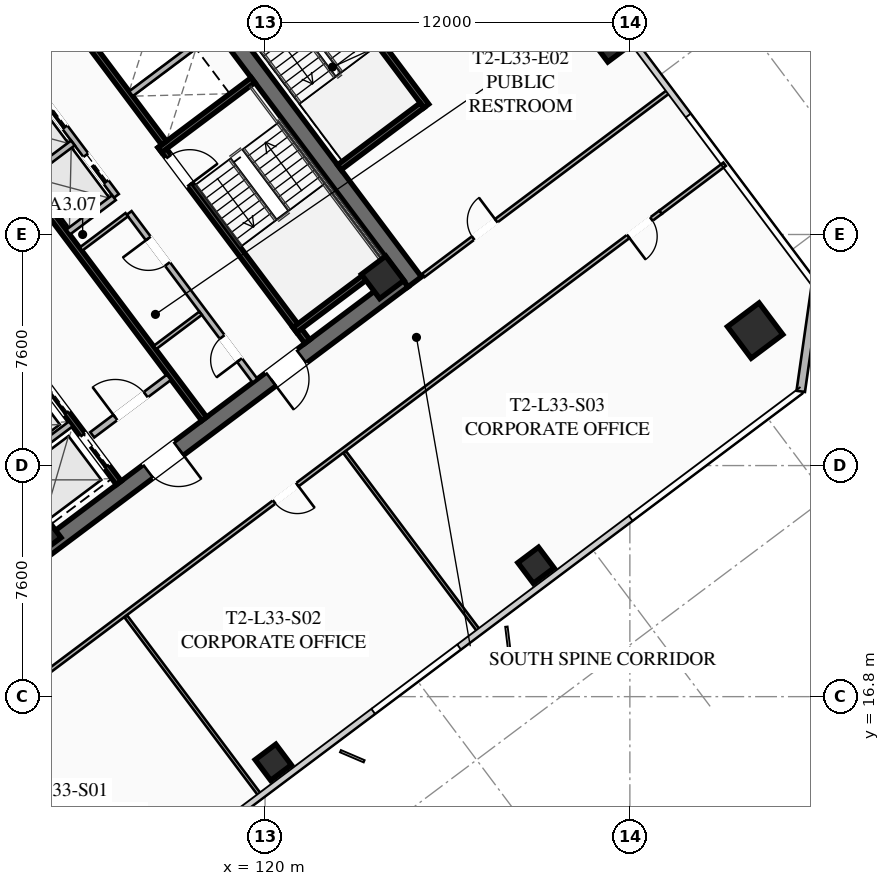
"""IFC4 building model, lengths in metres.
Left out: names, types, materials, properties, quantities, classifications, styles, units other than length and angle.
Written with IfcOpenShell. Run it as: python <this file> out.ifc"""

import sys

from ifc_helpers import new_model, si_unit, direction, frame, frame_2d, origin, origin_2d, place, context, subcontext, project, spatial, rectangle, hollow_rectangle, extrude, element, fill, save


model = new_model("IFC4")
c1 = context("Model", 3, precision=1e-05, world=origin(), true_north=direction((0.0, 1.0)))
c2 = subcontext(c1, "Body", "Model", "MODEL_VIEW")
j1 = project(units=[si_unit("LENGTHUNIT", "METRE"), si_unit("PLANEANGLEUNIT", "RADIAN")], contexts=[c1])
p1 = place(None, origin())
s1 = spatial("IfcSite", under=j1, at=p1, CompositionType="ELEMENT")
p2 = place(p1, origin())
s2 = spatial("IfcBuilding", under=s1, at=p2, CompositionType="ELEMENT")
p3 = place(p2, frame((0.0, 0.0, 125.05)))
s3 = spatial("IfcBuildingStorey", under=s2, at=p3, CompositionType="ELEMENT", Elevation=125.05)
p4 = place(p3, frame((115.564, 42.923, 0.0), z_axis=(0.0, 0.0, 1.0), x_axis=(0.600005007985, -0.799996243986, 0.0)))
e1 = element("IfcWall", 1, at=p4, inside=s3, PredefinedType="SHEAR", context=c2, shape_type="SweptSolid", body=[
    extrude(rectangle(XDim=15.6, YDim=0.55, at=frame_2d((7.8, 0.0))), origin(), (0.0, 0.0, 1.0), 3.55),
])
p5 = place(p3, frame((124.539, 30.498, 0.0), z_axis=(0.0, 0.0, 1.0), x_axis=(-0.799998054672, -0.600002593761, 0.0)))
e2 = element("IfcWall", 2, at=p5, inside=s3, PredefinedType="SHEAR", context=c2, shape_type="SweptSolid", body=[
    extrude(rectangle(XDim=15.06, YDim=0.55, at=frame_2d((7.53, 0.0))), origin(), (0.0, 0.0, 1.0), 3.55),
])
p6 = place(p5, frame((9.23, 0.0, 0.0)))
e3 = element("IfcOpeningElement", 3, at=p6, cuts=e2, PredefinedType="OPENING", context=c2, shape_type="SweptSolid", body=[
    extrude(rectangle(XDim=1.25, YDim=2.25, at=frame_2d((0.625, 1.125))), frame((0.0, 0.285, 0.0), z_axis=(0.0, -1.0, 0.0), x_axis=(1.0, 0.0, 0.0)), (0.0, 0.0, 1.0), 0.57),
])
p7 = place(p5, frame((4.18, 0.0, 0.0)))
e4 = element("IfcOpeningElement", 4, at=p7, cuts=e2, PredefinedType="OPENING", context=c2, shape_type="SweptSolid", body=[
    extrude(rectangle(XDim=1.25, YDim=2.25, at=frame_2d((0.625, 1.125))), frame((0.0, 0.285, 0.0), z_axis=(0.0, -1.0, 0.0), x_axis=(1.0, 0.0, 0.0)), (0.0, 0.0, 1.0), 0.57),
])
p8 = place(p3, frame((103.461, 33.502, 0.0), z_axis=(0.0, 0.0, 1.0), x_axis=(0.799998054672, 0.600002593761, 0.0)))
e5 = element("IfcWall", 5, at=p8, inside=s3, PredefinedType="SHEAR", context=c2, shape_type="SweptSolid", body=[
    extrude(rectangle(XDim=15.06, YDim=0.55, at=frame_2d((7.53, 0.0))), origin(), (0.0, 0.0, 1.0), 3.55),
])
p9 = place(p8, frame((4.58, 0.0, 0.0)))
e6 = element("IfcOpeningElement", 6, at=p9, cuts=e5, PredefinedType="OPENING", context=c2, shape_type="SweptSolid", body=[
    extrude(rectangle(XDim=1.25, YDim=2.25, at=frame_2d((0.625, 1.125))), frame((0.0, 0.285, 0.0), z_axis=(0.0, -1.0, 0.0), x_axis=(1.0, 0.0, 0.0)), (0.0, 0.0, 1.0), 0.57),
])
p10 = place(p8, frame((9.63, 0.0, 0.0)))
e7 = element("IfcOpeningElement", 7, at=p10, cuts=e5, PredefinedType="OPENING", context=c2, shape_type="SweptSolid", body=[
    extrude(rectangle(XDim=1.25, YDim=2.25, at=frame_2d((0.625, 1.125))), frame((0.0, 0.285, 0.0), z_axis=(0.0, -1.0, 0.0), x_axis=(1.0, 0.0, 0.0)), (0.0, 0.0, 1.0), 0.57),
])
for number, where, z_axis, x_axis in (
    (8, (112.59, 22.13, 0.0), (0.0, 0.0, 1.0), (0.8, 0.6, 0.0)),
    (9, (123.87, 30.59, 0.0), (0.0, 0.0, 1.0), (0.8, 0.6, 0.0)),
):
    element("IfcColumn", number, at=place(p3, frame(where, z_axis=z_axis, x_axis=x_axis)), inside=s3, PredefinedType="COLUMN", context=c2, shape_type="SweptSolid", body=[
        extrude(hollow_rectangle(XDim=1.0, YDim=1.0, WallThickness=0.04, at=origin_2d()), origin(), (0.0, 0.0, 1.0), 3.37),
    ])
p11 = place(p3, frame((136.12, 28.84, 0.0), z_axis=(0.0, 0.0, 1.0), x_axis=(0.799999996291, 0.600000004945, 0.0)))
e10 = element("IfcColumn", 10, at=p11, inside=s3, PredefinedType="COLUMN", context=c2, shape_type="SweptSolid", body=[
    extrude(hollow_rectangle(XDim=1.3, YDim=1.3, WallThickness=0.05, at=origin_2d()), origin(), (0.0, 0.0, 1.0), 3.37),
])
for number, where, z_axis, x_axis in (
    (11, (120.27, 14.64, 0.0), (0.0, 0.0, 1.0), (0.8, 0.6, 0.0)),
    (12, (128.91, 21.12, 0.0), (0.0, 0.0, 1.0), (0.8, 0.6, 0.0)),
    (13, (131.36, 38.27, 0.0), (0.0, 0.0, 1.0), (0.8, 0.6, 0.0)),
):
    element("IfcColumn", number, at=place(p3, frame(where, z_axis=z_axis, x_axis=x_axis)), inside=s3, PredefinedType="COLUMN", context=c2, shape_type="SweptSolid", body=[
        extrude(hollow_rectangle(XDim=0.85, YDim=0.85, WallThickness=0.035, at=origin_2d()), origin(), (0.0, 0.0, 1.0), 3.37),
    ])
p12 = place(p3, frame((138.12, 30.34, 0.0), z_axis=(0.0, 0.0, 1.0), x_axis=(-0.141421356237, -0.989949493661, 0.0)))
e14 = element("IfcWall", 14, at=p12, inside=s3, PredefinedType="SOLIDWALL", context=c2, shape_type="SweptSolid", body=[
    extrude(rectangle(XDim=3.536, YDim=0.28, at=frame_2d((1.768, 0.0))), origin(), (0.0, 0.0, 1.0), 3.37),
])
p13 = place(p3, frame((116.56, 34.92, 0.0), z_axis=(0.0, 0.0, 1.0), x_axis=(0.59999029481, -0.8000072788, 0.0)))
e15 = element("IfcWall", 15, at=p13, inside=s3, PredefinedType="SHEAR", context=c2, shape_type="SweptSolid", body=[
    extrude(rectangle(XDim=8.05, YDim=0.2, at=frame_2d((4.025, 0.0))), origin(), (0.0, 0.0, 1.0), 3.37),
])
p14 = place(p13, frame((0.45, 0.0, 0.0)))
e16 = element("IfcOpeningElement", 16, at=p14, cuts=e15, PredefinedType="OPENING", context=c2, shape_type="SweptSolid", body=[
    extrude(rectangle(XDim=1.15, YDim=2.2, at=frame_2d((0.575, 1.1))), frame((0.0, 0.11, 0.0), z_axis=(0.0, -1.0, 0.0), x_axis=(1.0, 0.0, 0.0)), (0.0, 0.0, 1.0), 0.22),
])
for number, where, z_axis, x_axis in (
    (17, (116.54, 34.78, 0.0), (0.0, 0.0, 1.0), (0.8, 0.6, 0.0)),
    (18, (120.98, 28.86, 0.0), (0.0, 0.0, 1.0), (0.8, 0.6, 0.0)),
):
    element("IfcWall", number, at=place(p3, frame(where, z_axis=z_axis, x_axis=x_axis)), inside=s3, PredefinedType="SHEAR", context=c2, shape_type="SweptSolid", body=[
        extrude(rectangle(XDim=3.83, YDim=0.2, at=frame_2d((1.915, 0.0))), origin(), (0.0, 0.0, 1.0), 3.37),
    ])
p15 = place(p3, frame((117.998, 25.936, 0.0), z_axis=(0.0, 0.0, 1.0), x_axis=(-0.600002693989, 0.799997979501, 0.0)))
e19 = element("IfcWall", 19, at=p15, inside=s3, PredefinedType="SHEAR", context=c2, shape_type="SweptSolid", body=[
    extrude(rectangle(XDim=14.5, YDim=0.2, at=frame_2d((7.25, 0.0))), origin(), (0.0, 0.0, 1.0), 3.37),
])
p16 = place(p3, frame((114.316, 25.412, 0.0), z_axis=(0.0, 0.0, 1.0), x_axis=(0.800018601094, 0.59997519774, 0.0)))
e20 = element("IfcWall", 20, at=p16, inside=s3, PredefinedType="SOLIDWALL", context=c2, shape_type="SweptSolid", body=[
    extrude(rectangle(XDim=3.15, YDim=0.22, at=frame_2d((1.575, 0.0))), origin(), (0.0, 0.0, 1.0), 2.723),
])
p17 = place(p16, frame((0.95, 0.0, 0.0)))
e21 = element("IfcOpeningElement", 21, at=p17, cuts=e20, PredefinedType="OPENING", context=c2, shape_type="SweptSolid", body=[
    extrude(rectangle(XDim=1.25, YDim=2.25, at=frame_2d((0.625, 1.125))), frame((0.0, 0.12, 0.0), z_axis=(0.0, -1.0, 0.0), x_axis=(1.0, 0.0, 0.0)), (0.0, 0.0, 1.0), 0.24),
])
p18 = place(p3, frame((115.19, 23.83, 0.0), z_axis=(0.0, 0.0, 1.0), x_axis=(-0.599993943644, 0.800004542231, 0.0)))
e22 = element("IfcWall", 22, at=p18, inside=s3, PredefinedType="SHEAR", context=c2, shape_type="SweptSolid", body=[
    extrude(rectangle(XDim=6.45, YDim=0.2, at=frame_2d((3.225, 0.0))), origin(), (0.0, 0.0, 1.0), 3.37),
])
p19 = place(p18, frame((4.875, 0.0, 0.0)))
e23 = element("IfcOpeningElement", 23, at=p19, cuts=e22, PredefinedType="OPENING", context=c2, shape_type="SweptSolid", body=[
    extrude(rectangle(XDim=1.3, YDim=2.25, at=frame_2d((0.65, 1.125))), frame((0.0, 0.11, 0.0), z_axis=(0.0, -1.0, 0.0), x_axis=(1.0, 0.0, 0.0)), (0.0, 0.0, 1.0), 0.22),
])
p20 = place(p18, frame((2.875, 0.0, 0.0)))
e24 = element("IfcOpeningElement", 24, at=p20, cuts=e22, PredefinedType="OPENING", context=c2, shape_type="SweptSolid", body=[
    extrude(rectangle(XDim=1.3, YDim=2.25, at=frame_2d((0.65, 1.125))), frame((0.0, 0.11, 0.0), z_axis=(0.0, -1.0, 0.0), x_axis=(1.0, 0.0, 0.0)), (0.0, 0.0, 1.0), 0.22),
])
p21 = place(p18, frame((0.675, 0.0, 0.0)))
e25 = element("IfcOpeningElement", 25, at=p21, cuts=e22, PredefinedType="OPENING", context=c2, shape_type="SweptSolid", body=[
    extrude(rectangle(XDim=1.3, YDim=2.25, at=frame_2d((0.65, 1.125))), frame((0.0, 0.11, 0.0), z_axis=(0.0, -1.0, 0.0), x_axis=(1.0, 0.0, 0.0)), (0.0, 0.0, 1.0), 0.22),
])
p22 = place(p3, frame((110.826, 23.682, 0.0), z_axis=(0.0, 0.0, 1.0), x_axis=(0.8, 0.6, 0.0)))
e26 = element("IfcWall", 26, at=p22, inside=s3, PredefinedType="SOLIDWALL", context=c2, shape_type="SweptSolid", body=[
    extrude(rectangle(XDim=3.48, YDim=0.2, at=frame_2d((1.74, 0.0))), origin(), (0.0, 0.0, 1.0), 3.37),
])
p23 = place(p3, frame((112.81, 40.17, 0.0), z_axis=(0.0, 0.0, 1.0), x_axis=(0.599993943644, -0.800004542231, 0.0)))
e27 = element("IfcWall", 27, at=p23, inside=s3, PredefinedType="SHEAR", context=c2, shape_type="SweptSolid", body=[
    extrude(rectangle(XDim=6.45, YDim=0.2, at=frame_2d((3.225, 0.0))), origin(), (0.0, 0.0, 1.0), 3.37),
])
p24 = place(p3, frame((115.59, 36.63, 0.0), z_axis=(0.0, 0.0, 1.0), x_axis=(0.799974743577, 0.600033673754, 0.0)))
e28 = element("IfcWall", 28, at=p24, inside=s3, PredefinedType="SOLIDWALL", context=c2, shape_type="SweptSolid", body=[
    extrude(rectangle(XDim=3.48, YDim=0.2, at=frame_2d((1.74, 0.0))), origin(), (0.0, 0.0, 1.0), 3.37),
])
p25 = place(p3, frame((119.67, 27.19, 0.0), z_axis=(0.0, 0.0, 1.0), x_axis=(-0.599988677396, 0.800008491828, 0.0)))
e29 = element("IfcWall", 29, at=p25, inside=s3, PredefinedType="SOLIDWALL", context=c2, shape_type="SweptSolid", body=[
    extrude(rectangle(XDim=6.9, YDim=0.2, at=frame_2d((3.45, 0.0))), origin(), (0.0, 0.0, 1.0), 2.723),
])
p26 = place(p25, frame((0.85, 0.0, 0.0)))
e30 = element("IfcOpeningElement", 30, at=p26, cuts=e29, PredefinedType="OPENING", context=c2, shape_type="SweptSolid", body=[
    extrude(rectangle(XDim=0.95, YDim=2.05, at=frame_2d((0.475, 1.025))), frame((0.0, 0.11, 0.0), z_axis=(0.0, -1.0, 0.0), x_axis=(1.0, 0.0, 0.0)), (0.0, 0.0, 1.0), 0.22),
])
p27 = place(p25, frame((4.8, 0.0, 0.0)))
e31 = element("IfcOpeningElement", 31, at=p27, cuts=e29, PredefinedType="OPENING", context=c2, shape_type="SweptSolid", body=[
    extrude(rectangle(XDim=1.05, YDim=2.2, at=frame_2d((0.525, 1.1))), frame((0.0, 0.11, 0.0), z_axis=(0.0, -1.0, 0.0), x_axis=(1.0, 0.0, 0.0)), (0.0, 0.0, 1.0), 0.22),
])
for number, where, z_axis, x_axis in (
    (32, (113.946, 31.522, 0.0), (0.0, 0.0, 1.0), (0.8, 0.6, 0.0)),
    (33, (116.376, 28.282, 0.0), (0.0, 0.0, 1.0), (0.8, 0.6, 0.0)),
):
    element("IfcWall", number, at=place(p3, frame(where, z_axis=z_axis, x_axis=x_axis)), inside=s3, PredefinedType="PARTITIONING", context=c2, shape_type="SweptSolid", body=[
        extrude(rectangle(XDim=1.88, YDim=0.135, at=frame_2d((0.94, 0.0))), origin(), (0.0, 0.0, 1.0), 2.723),
    ])
p28 = place(p3, frame((115.11, 33.27, 0.0), z_axis=(0.0, 0.0, 1.0), x_axis=(-0.600011322243, 0.799991508192, 0.0)))
e34 = element("IfcWall", 34, at=p28, inside=s3, PredefinedType="SOLIDWALL", context=c2, shape_type="SweptSolid", body=[
    extrude(rectangle(XDim=6.9, YDim=0.2, at=frame_2d((3.45, 0.0))), origin(), (0.0, 0.0, 1.0), 3.37),
])
p29 = place(p28, frame((0.575, 0.0, 0.0)))
e35 = element("IfcOpeningElement", 35, at=p29, cuts=e34, PredefinedType="OPENING", context=c2, shape_type="SweptSolid", body=[
    extrude(rectangle(XDim=1.1, YDim=2.2, at=frame_2d((0.55, 1.1))), frame((0.0, 0.11, 0.0), z_axis=(0.0, -1.0, 0.0), x_axis=(1.0, 0.0, 0.0)), (0.0, 0.0, 1.0), 0.22),
])
p30 = place(p28, frame((2.825, 0.0, 0.0)))
e36 = element("IfcOpeningElement", 36, at=p30, cuts=e34, PredefinedType="OPENING", context=c2, shape_type="SweptSolid", body=[
    extrude(rectangle(XDim=1.1, YDim=2.2, at=frame_2d((0.55, 1.1))), frame((0.0, 0.11, 0.0), z_axis=(0.0, -1.0, 0.0), x_axis=(1.0, 0.0, 0.0)), (0.0, 0.0, 1.0), 0.22),
])
p31 = place(p28, frame((5.075, 0.0, 0.0)))
e37 = element("IfcOpeningElement", 37, at=p31, cuts=e34, PredefinedType="OPENING", context=c2, shape_type="SweptSolid", body=[
    extrude(rectangle(XDim=1.1, YDim=2.2, at=frame_2d((0.55, 1.1))), frame((0.0, 0.11, 0.0), z_axis=(0.0, -1.0, 0.0), x_axis=(1.0, 0.0, 0.0)), (0.0, 0.0, 1.0), 0.22),
])
p32 = place(p3, frame((113.526, 32.082, 0.0), z_axis=(0.0, 0.0, 1.0), x_axis=(0.800046745961, 0.599937666993, 0.0)))
e38 = element("IfcWall", 38, at=p32, inside=s3, PredefinedType="SOLIDWALL", context=c2, shape_type="SweptSolid", body=[
    extrude(rectangle(XDim=1.88, YDim=0.2, at=frame_2d((0.94, 0.0))), origin(), (0.0, 0.0, 1.0), 3.37),
])
p33 = place(p3, frame((112.176, 33.882, 0.0), z_axis=(0.0, 0.0, 1.0), x_axis=(0.8, 0.6, 0.0)))
e39 = element("IfcWall", 39, at=p33, inside=s3, PredefinedType="SOLIDWALL", context=c2, shape_type="SweptSolid", body=[
    extrude(rectangle(XDim=1.88, YDim=0.2, at=frame_2d((0.94, 0.0))), origin(), (0.0, 0.0, 1.0), 3.37),
])
p34 = place(p3, frame((125.304, 36.228, 0.0), z_axis=(0.0, 0.0, 1.0), x_axis=(-0.59998851072, 0.800008616831, 0.0)))
e40 = element("IfcWall", 40, at=p34, inside=s3, PredefinedType="SHEAR", context=c2, shape_type="SweptSolid", body=[
    extrude(rectangle(XDim=6.8, YDim=0.2, at=frame_2d((3.4, 0.0))), origin(), (0.0, 0.0, 1.0), 3.37),
])
p35 = place(p3, frame((122.444, 34.208, 0.0), z_axis=(0.0, 0.0, 1.0), x_axis=(0.79999138319, 0.600011488909, 0.0)))
e41 = element("IfcWall", 41, at=p35, inside=s3, PredefinedType="SHEAR", context=c2, shape_type="SweptSolid", body=[
    extrude(rectangle(XDim=3.4, YDim=0.2, at=frame_2d((1.7, 0.0))), origin(), (0.0, 0.0, 1.0), 3.37),
])
p36 = place(p3, frame((95.81, 30.17, 0.0), z_axis=(0.0, 0.0, 1.0), x_axis=(0.8, 0.6, 0.0)))
e42 = element("IfcWall", 42, at=p36, inside=s3, PredefinedType="PARTITIONING", context=c2, shape_type="SweptSolid", body=[
    extrude(rectangle(XDim=31.3, YDim=0.135, at=frame_2d((15.65, 0.0))), origin(), (0.0, 0.0, 1.0), 2.723),
])
p37 = place(p36, frame((0.3, 0.0, 0.0)))
e43 = element("IfcOpeningElement", 43, at=p37, cuts=e42, PredefinedType="OPENING", context=c2, shape_type="SweptSolid", body=[
    extrude(rectangle(XDim=0.95, YDim=2.05, at=frame_2d((0.475, 1.025))), frame((0.0, 0.077, 0.0), z_axis=(0.0, -1.0, 0.0), x_axis=(1.0, 0.0, 0.0)), (0.0, 0.0, 1.0), 0.155),
])
p38 = place(p36, frame((15.438, 0.0, 0.0)))
e44 = element("IfcOpeningElement", 44, at=p38, cuts=e42, PredefinedType="OPENING", context=c2, shape_type="SweptSolid", body=[
    extrude(rectangle(XDim=0.95, YDim=2.05, at=frame_2d((0.475, 1.025))), frame((0.0, 0.077, 0.0), z_axis=(0.0, -1.0, 0.0), x_axis=(1.0, 0.0, 0.0)), (0.0, 0.0, 1.0), 0.155),
])
p39 = place(p36, frame((30.05, 0.0, 0.0)))
e45 = element("IfcOpeningElement", 45, at=p39, cuts=e42, PredefinedType="OPENING", context=c2, shape_type="SweptSolid", body=[
    extrude(rectangle(XDim=0.95, YDim=2.05, at=frame_2d((0.475, 1.025))), frame((0.0, 0.077, 0.0), z_axis=(0.0, -1.0, 0.0), x_axis=(1.0, 0.0, 0.0)), (0.0, 0.0, 1.0), 0.155),
])
p40 = place(p3, frame((133.012, 32.734, 0.0), z_axis=(0.0, 0.0, 1.0), x_axis=(-0.800003744006, -0.59999500796, 0.0)))
e46 = element("IfcWall", 46, at=p40, inside=s3, PredefinedType="PARTITIONING", context=c2, shape_type="SweptSolid", body=[
    extrude(rectangle(XDim=31.3, YDim=0.135, at=frame_2d((15.65, 0.0))), origin(), (0.0, 0.0, 1.0), 2.723),
])
p41 = place(p40, frame((29.97, 0.0, 0.0)))
e47 = element("IfcOpeningElement", 47, at=p41, cuts=e46, PredefinedType="OPENING", context=c2, shape_type="SweptSolid", body=[
    extrude(rectangle(XDim=0.95, YDim=2.05, at=frame_2d((0.475, 1.025))), frame((0.0, 0.077, 0.0), z_axis=(0.0, -1.0, 0.0), x_axis=(1.0, 0.0, 0.0)), (0.0, 0.0, 1.0), 0.155),
])
p42 = place(p40, frame((14.938, 0.0, 0.0)))
e48 = element("IfcOpeningElement", 48, at=p42, cuts=e46, PredefinedType="OPENING", context=c2, shape_type="SweptSolid", body=[
    extrude(rectangle(XDim=0.95, YDim=2.05, at=frame_2d((0.475, 1.025))), frame((0.0, 0.077, 0.0), z_axis=(0.0, -1.0, 0.0), x_axis=(1.0, 0.0, 0.0)), (0.0, 0.0, 1.0), 0.155),
])
p43 = place(p40, frame((0.38, 0.0, 0.0)))
e49 = element("IfcOpeningElement", 49, at=p43, cuts=e46, PredefinedType="OPENING", context=c2, shape_type="SweptSolid", body=[
    extrude(rectangle(XDim=0.95, YDim=2.05, at=frame_2d((0.475, 1.025))), frame((0.0, 0.077, 0.0), z_axis=(0.0, -1.0, 0.0), x_axis=(1.0, 0.0, 0.0)), (0.0, 0.0, 1.0), 0.155),
])
p44 = place(p3, frame((133.012, 32.734, 0.0), z_axis=(0.0, 0.0, 1.0), x_axis=(0.799977721118, 0.600029704027, 0.0)))
e50 = element("IfcWall", 50, at=p44, inside=s3, PredefinedType="PARTITIONING", context=c2, shape_type="SweptSolid", body=[
    extrude(rectangle(XDim=2.63, YDim=0.135, at=frame_2d((1.315, 0.0))), origin(), (0.0, 0.0, 1.0), 2.723),
])
for number, where, z_axis, x_axis in (
    (51, (119.848, 13.536, 0.0), (0.0, 0.0, 1.0), (-0.6, 0.8, 0.0)),
    (52, (127.048, 18.936, 0.0), (0.0, 0.0, 1.0), (-0.6, 0.8, 0.0)),
):
    element("IfcWall", number, at=place(p3, frame(where, z_axis=z_axis, x_axis=x_axis)), inside=s3, PredefinedType="PARTITIONING", context=c2, shape_type="SweptSolid", body=[
        extrude(rectangle(XDim=7.38, YDim=0.11, at=frame_2d((3.69, 0.0))), origin(), (0.0, 0.0, 1.0), 2.723),
    ])
p45 = place(p3, frame((125.208, 30.656, 0.0), z_axis=(0.0, 0.0, 1.0), x_axis=(0.799997105034, 0.600003859935, 0.0)))
e53 = element("IfcWall", 53, at=p45, inside=s3, PredefinedType="PARTITIONING", context=c2, shape_type="SweptSolid", body=[
    extrude(rectangle(XDim=10.12, YDim=0.135, at=frame_2d((5.06, 0.0))), origin(), (0.0, 0.0, 1.0), 2.723),
])
p46 = place(p45, frame((2.045, 0.0, 0.0)))
e54 = element("IfcOpeningElement", 54, at=p46, cuts=e53, PredefinedType="OPENING", context=c2, shape_type="SweptSolid", body=[
    extrude(rectangle(XDim=0.95, YDim=2.05, at=frame_2d((0.475, 1.025))), frame((0.0, 0.077, 0.0), z_axis=(0.0, -1.0, 0.0), x_axis=(1.0, 0.0, 0.0)), (0.0, 0.0, 1.0), 0.155),
])
p47 = place(p6, origin())
e55 = element("IfcDoor", 55, at=p47, inside=s3, OperationType="SINGLE_SWING_LEFT", PredefinedType="DOOR", context=c2, shape_type="SweptSolid", body=[
    extrude(rectangle(XDim=1.25, YDim=2.25, at=frame_2d((0.625, 1.125))), frame((0.0, 0.025, 0.0), z_axis=(0.0, -1.0, 0.0), x_axis=(1.0, 0.0, 0.0)), (0.0, 0.0, 1.0), 0.05),
])
fill(e3, e55)
p48 = place(p7, origin())
e56 = element("IfcDoor", 56, at=p48, inside=s3, OperationType="SINGLE_SWING_RIGHT", PredefinedType="DOOR", context=c2, shape_type="SweptSolid", body=[
    extrude(rectangle(XDim=1.25, YDim=2.25, at=frame_2d((0.625, 1.125))), frame((0.0, 0.025, 0.0), z_axis=(0.0, -1.0, 0.0), x_axis=(1.0, 0.0, 0.0)), (0.0, 0.0, 1.0), 0.05),
])
fill(e4, e56)
p49 = place(p14, origin())
e57 = element("IfcDoor", 57, at=p49, inside=s3, OperationType="SINGLE_SWING_RIGHT", PredefinedType="DOOR", context=c2, shape_type="SweptSolid", body=[
    extrude(rectangle(XDim=1.15, YDim=2.2, at=frame_2d((0.575, 1.1))), frame((0.0, 0.025, 0.0), z_axis=(0.0, -1.0, 0.0), x_axis=(1.0, 0.0, 0.0)), (0.0, 0.0, 1.0), 0.05),
])
fill(e16, e57)
p50 = place(p17, origin())
e58 = element("IfcDoor", 58, at=p50, inside=s3, OperationType="SINGLE_SWING_LEFT", PredefinedType="DOOR", context=c2, shape_type="SweptSolid", body=[
    extrude(rectangle(XDim=1.25, YDim=2.25, at=frame_2d((0.625, 1.125))), frame((0.0, 0.025, 0.0), z_axis=(0.0, -1.0, 0.0), x_axis=(1.0, 0.0, 0.0)), (0.0, 0.0, 1.0), 0.05),
])
fill(e21, e58)
p51 = place(p26, origin())
e59 = element("IfcDoor", 59, at=p51, inside=s3, OperationType="SINGLE_SWING_LEFT", PredefinedType="DOOR", context=c2, shape_type="SweptSolid", body=[
    extrude(rectangle(XDim=0.95, YDim=2.05, at=frame_2d((0.475, 1.025))), frame((0.0, 0.025, 0.0), z_axis=(0.0, -1.0, 0.0), x_axis=(1.0, 0.0, 0.0)), (0.0, 0.0, 1.0), 0.05),
])
fill(e30, e59)
p52 = place(p27, origin())
e60 = element("IfcDoor", 60, at=p52, inside=s3, OperationType="SINGLE_SWING_RIGHT", PredefinedType="DOOR", context=c2, shape_type="SweptSolid", body=[
    extrude(rectangle(XDim=1.05, YDim=2.2, at=frame_2d((0.525, 1.1))), frame((0.0, 0.025, 0.0), z_axis=(0.0, -1.0, 0.0), x_axis=(1.0, 0.0, 0.0)), (0.0, 0.0, 1.0), 0.05),
])
fill(e31, e60)
p53 = place(p42, origin())
e61 = element("IfcDoor", 61, at=p53, inside=s3, OperationType="SINGLE_SWING_LEFT", PredefinedType="DOOR", context=c2, shape_type="SweptSolid", body=[
    extrude(rectangle(XDim=0.95, YDim=2.05, at=frame_2d((0.475, 1.025))), frame((0.0, 0.025, 0.0), z_axis=(0.0, -1.0, 0.0), x_axis=(1.0, 0.0, 0.0)), (0.0, 0.0, 1.0), 0.05),
])
fill(e48, e61)
p54 = place(p43, origin())
e62 = element("IfcDoor", 62, at=p54, inside=s3, OperationType="SINGLE_SWING_RIGHT", PredefinedType="DOOR", context=c2, shape_type="SweptSolid", body=[
    extrude(rectangle(XDim=0.95, YDim=2.05, at=frame_2d((0.475, 1.025))), frame((0.0, 0.025, 0.0), z_axis=(0.0, -1.0, 0.0), x_axis=(1.0, 0.0, 0.0)), (0.0, 0.0, 1.0), 0.05),
])
fill(e49, e62)
p55 = place(p46, origin())
e63 = element("IfcDoor", 63, at=p55, inside=s3, OperationType="SINGLE_SWING_RIGHT", PredefinedType="DOOR", context=c2, shape_type="SweptSolid", body=[
    extrude(rectangle(XDim=0.95, YDim=2.05, at=frame_2d((0.475, 1.025))), frame((0.0, 0.025, 0.0), z_axis=(0.0, -1.0, 0.0), x_axis=(1.0, 0.0, 0.0)), (0.0, 0.0, 1.0), 0.05),
])
fill(e54, e63)
p56 = place(p20, origin())
e64 = element("IfcDoor", 64, at=p56, inside=s3, OperationType="SLIDING_TO_LEFT", PredefinedType="DOOR", context=c2, shape_type="SweptSolid", body=[
    extrude(rectangle(XDim=1.3, YDim=2.25, at=frame_2d((0.65, 1.125))), frame((0.0, 0.025, 0.0), z_axis=(0.0, -1.0, 0.0), x_axis=(1.0, 0.0, 0.0)), (0.0, 0.0, 1.0), 0.05),
])
fill(e24, e64)
p57 = place(p21, origin())
e65 = element("IfcDoor", 65, at=p57, inside=s3, OperationType="SLIDING_TO_LEFT", PredefinedType="DOOR", context=c2, shape_type="SweptSolid", body=[
    extrude(rectangle(XDim=1.3, YDim=2.25, at=frame_2d((0.65, 1.125))), frame((0.0, 0.025, 0.0), z_axis=(0.0, -1.0, 0.0), x_axis=(1.0, 0.0, 0.0)), (0.0, 0.0, 1.0), 0.05),
])
fill(e25, e65)
p58 = place(p29, origin())
e66 = element("IfcDoor", 66, at=p58, inside=s3, OperationType="SLIDING_TO_LEFT", PredefinedType="DOOR", context=c2, shape_type="SweptSolid", body=[
    extrude(rectangle(XDim=1.1, YDim=2.2, at=frame_2d((0.55, 1.1))), frame((0.0, 0.025, 0.0), z_axis=(0.0, -1.0, 0.0), x_axis=(1.0, 0.0, 0.0)), (0.0, 0.0, 1.0), 0.05),
])
fill(e35, e66)
p59 = place(p30, origin())
e67 = element("IfcDoor", 67, at=p59, inside=s3, OperationType="SLIDING_TO_LEFT", PredefinedType="DOOR", context=c2, shape_type="SweptSolid", body=[
    extrude(rectangle(XDim=1.1, YDim=2.2, at=frame_2d((0.55, 1.1))), frame((0.0, 0.025, 0.0), z_axis=(0.0, -1.0, 0.0), x_axis=(1.0, 0.0, 0.0)), (0.0, 0.0, 1.0), 0.05),
])
fill(e36, e67)
save(model, sys.argv[1])
